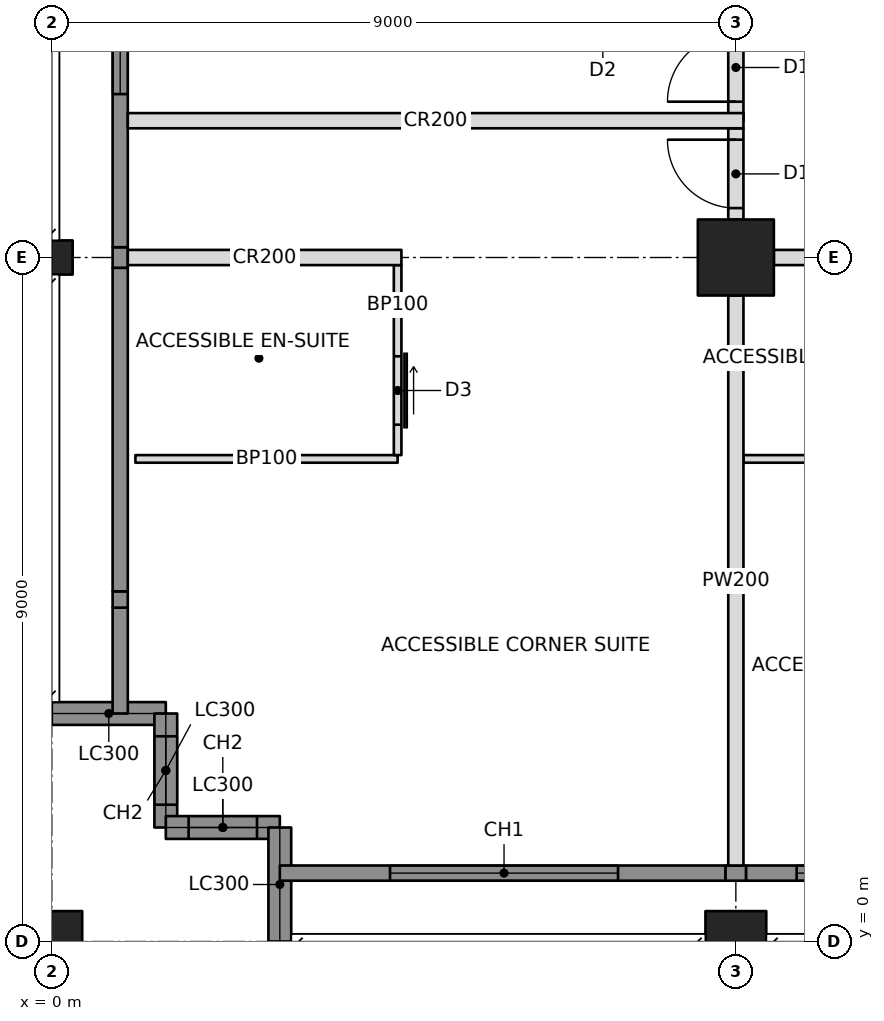
"""IFC4 building model, lengths in metres.
Left out: names, types, materials, properties, quantities, classifications, styles, units other than length and angle.
Written with IfcOpenShell. Run it as: python <this file> out.ifc"""

import sys

from ifc_helpers import new_model, si_unit, direction, frame, frame_2d, origin, origin_with_axes, origin_2d, place, context, subcontext, project, spatial, rectangle, hollow_rectangle, i_section, extrude, element, fill, save


model = new_model("IFC4")
c1 = context("Model", 3, precision=1e-05, world=origin(), true_north=direction((0.0, 1.0)))
c2 = subcontext(c1, "Body", "Model", "MODEL_VIEW")
j1 = project(units=[si_unit("LENGTHUNIT", "METRE"), si_unit("PLANEANGLEUNIT", "RADIAN")], contexts=[c1])
p1 = place(None, origin())
s1 = spatial("IfcSite", under=j1, at=p1, CompositionType="ELEMENT")
p2 = place(p1, origin())
s2 = spatial("IfcBuilding", under=s1, at=p2, CompositionType="ELEMENT")
p3 = place(p2, frame((0.0, 0.0, 163.8)))
s3 = spatial("IfcBuildingStorey", under=s2, at=p3, CompositionType="ELEMENT", Elevation=163.8)
p4 = place(p3, origin_with_axes())
e1 = element("IfcColumn", 1, at=p4, inside=s3, PredefinedType="COLUMN", context=c2, shape_type="SweptSolid", body=[
    extrude(hollow_rectangle(XDim=0.8, YDim=0.8, WallThickness=0.07, at=origin_2d()), origin(), (0.0, 0.0, 1.0), 3.4),
])
p5 = place(p3, frame((0.0, 9.0, 0.0), z_axis=(0.0, 0.0, 1.0), x_axis=(0.0, 1.0, 0.0)))
e2 = element("IfcColumn", 2, at=p5, inside=s3, PredefinedType="COLUMN", context=c2, shape_type="SweptSolid", body=[
    extrude(i_section(OverallWidth=0.449, OverallDepth=0.549, WebThickness=0.072, FlangeThickness=0.115, at=origin_2d()), origin(), (0.0, 0.0, 1.0), 3.4),
])
p6 = place(p3, frame((9.0, 0.0, 0.0), z_axis=(0.0, 0.0, 1.0), x_axis=(1.0, 0.0, 0.0)))
e3 = element("IfcColumn", 3, at=p6, inside=s3, PredefinedType="COLUMN", context=c2, shape_type="SweptSolid", body=[
    extrude(hollow_rectangle(XDim=0.8, YDim=0.8, WallThickness=0.07, at=origin_2d()), origin(), (0.0, 0.0, 1.0), 3.4),
])
p7 = place(p3, frame((9.0, 9.0, 0.0), z_axis=(0.0, 0.0, 1.0), x_axis=(1.0, 0.0, 0.0)))
e4 = element("IfcColumn", 4, at=p7, inside=s3, PredefinedType="COLUMN", context=c2, shape_type="SweptSolid", body=[
    extrude(hollow_rectangle(XDim=1.0, YDim=1.0, WallThickness=0.1, at=origin_2d()), origin(), (0.0, 0.0, 1.0), 3.4),
])
p8 = place(p3, frame((0.0, 3.0, 0.0), z_axis=(0.0, 0.0, 1.0), x_axis=(1.0, 0.0, 0.0)))
e5 = element("IfcWall", 5, at=p8, inside=s3, PredefinedType="SOLIDWALL", context=c2, shape_type="SweptSolid", body=[
    extrude(rectangle(XDim=1.5, YDim=0.3, at=frame_2d((0.75, 0.0))), origin(), (0.0, 0.0, 1.0), 2.42),
])
p9 = place(p3, frame((1.5, 3.0, 0.0), z_axis=(0.0, 0.0, 1.0), x_axis=(0.0, -1.0, 0.0)))
e6 = element("IfcWall", 6, at=p9, inside=s3, PredefinedType="SOLIDWALL", context=c2, shape_type="SweptSolid", body=[
    extrude(rectangle(XDim=1.5, YDim=0.3, at=frame_2d((0.75, 0.0))), origin(), (0.0, 0.0, 1.0), 3.2),
])
p10 = place(p9, frame((0.3, 0.0, 0.6)))
e7 = element("IfcOpeningElement", 7, at=p10, cuts=e6, PredefinedType="OPENING", context=c2, shape_type="SweptSolid", body=[
    extrude(rectangle(XDim=0.9, YDim=2.2, at=frame_2d((0.45, 1.1))), frame((0.0, 0.16, 0.0), z_axis=(0.0, -1.0, 0.0), x_axis=(1.0, 0.0, 0.0)), (0.0, 0.0, 1.0), 0.32),
])
p11 = place(p3, frame((1.5, 1.5, 0.0), z_axis=(0.0, 0.0, 1.0), x_axis=(1.0, 0.0, 0.0)))
e8 = element("IfcWall", 8, at=p11, inside=s3, PredefinedType="SOLIDWALL", context=c2, shape_type="SweptSolid", body=[
    extrude(rectangle(XDim=1.5, YDim=0.3, at=frame_2d((0.75, 0.0))), origin(), (0.0, 0.0, 1.0), 3.2),
])
p12 = place(p11, frame((0.3, 0.0, 0.6)))
e9 = element("IfcOpeningElement", 9, at=p12, cuts=e8, PredefinedType="OPENING", context=c2, shape_type="SweptSolid", body=[
    extrude(rectangle(XDim=0.9, YDim=2.2, at=frame_2d((0.45, 1.1))), frame((0.0, 0.16, 0.0), z_axis=(0.0, -1.0, 0.0), x_axis=(1.0, 0.0, 0.0)), (0.0, 0.0, 1.0), 0.32),
])
p13 = place(p3, frame((3.0, 1.5, 0.0), z_axis=(0.0, 0.0, 1.0), x_axis=(0.0, -1.0, 0.0)))
e10 = element("IfcWall", 10, at=p13, inside=s3, PredefinedType="SOLIDWALL", context=c2, shape_type="SweptSolid", body=[
    extrude(rectangle(XDim=1.5, YDim=0.3, at=frame_2d((0.75, 0.0))), origin(), (0.0, 0.0, 1.0), 2.42),
])
p14 = place(p3, frame((3.0, 0.9, 0.0), z_axis=(0.0, 0.0, 1.0), x_axis=(1.0, 0.0, 0.0)))
e11 = element("IfcWall", 11, at=p14, inside=s3, PredefinedType="SOLIDWALL", context=c2, shape_type="SweptSolid", body=[
    extrude(rectangle(XDim=5.865, YDim=0.2, at=frame_2d((2.932, 0.0))), origin(), (0.0, 0.0, 1.0), 3.2),
])
p15 = place(p14, frame((1.45, 0.0, 0.6)))
e12 = element("IfcOpeningElement", 12, at=p15, cuts=e11, PredefinedType="OPENING", context=c2, shape_type="SweptSolid", body=[
    extrude(rectangle(XDim=3.0, YDim=2.2, at=frame_2d((1.5, 1.1))), frame((0.0, 0.11, 0.0), z_axis=(0.0, -1.0, 0.0), x_axis=(1.0, 0.0, 0.0)), (0.0, 0.0, 1.0), 0.22),
])
p16 = place(p3, frame((0.9, 3.0, 0.0), z_axis=(0.0, 0.0, 1.0), x_axis=(0.0, 1.0, 0.0)))
e13 = element("IfcWall", 13, at=p16, inside=s3, PredefinedType="SOLIDWALL", context=c2, shape_type="SweptSolid", body=[
    extrude(rectangle(XDim=1.393, YDim=0.2, at=frame_2d((0.696, 0.0))), origin(), (0.0, 0.0, 1.0), 3.2),
])
p17 = place(p3, frame((1.0, 9.0, 0.0), z_axis=(0.0, 0.0, 1.0), x_axis=(1.0, 0.0, 0.0)))
e14 = element("IfcWall", 14, at=p17, inside=s3, PredefinedType="PARTITIONING", context=c2, shape_type="SweptSolid", body=[
    extrude(rectangle(XDim=3.6, YDim=0.2, at=frame_2d((1.8, 0.0))), origin(), (0.0, 0.0, 1.0), 2.438),
])
p18 = place(p3, frame((9.5, 9.0, 0.0), z_axis=(0.0, 0.0, 1.0), x_axis=(1.0, 0.0, 0.0)))
e15 = element("IfcWall", 15, at=p18, inside=s3, PredefinedType="PARTITIONING", context=c2, shape_type="SweptSolid", body=[
    extrude(rectangle(XDim=8.0, YDim=0.2, at=frame_2d((4.0, 0.0))), origin(), (0.0, 0.0, 1.0), 2.405),
])
p19 = place(p18, frame((2.85, 0.0, 0.0)))
e16 = element("IfcOpeningElement", 16, at=p19, cuts=e15, PredefinedType="OPENING", context=c2, shape_type="SweptSolid", body=[
    extrude(rectangle(XDim=0.9, YDim=2.1, at=frame_2d((0.45, 1.05))), frame((0.0, 0.11, 0.0), z_axis=(0.0, -1.0, 0.0), x_axis=(1.0, 0.0, 0.0)), (0.0, 0.0, 1.0), 0.22),
])
p20 = place(p18, frame((4.25, 0.0, 0.0)))
e17 = element("IfcOpeningElement", 17, at=p20, cuts=e15, PredefinedType="OPENING", context=c2, shape_type="SweptSolid", body=[
    extrude(rectangle(XDim=0.9, YDim=2.1, at=frame_2d((0.45, 1.05))), frame((0.0, 0.11, 0.0), z_axis=(0.0, -1.0, 0.0), x_axis=(1.0, 0.0, 0.0)), (0.0, 0.0, 1.0), 0.22),
])
p21 = place(p3, frame((9.0, 10.8, 0.0), z_axis=(0.0, 0.0, 1.0), x_axis=(0.0, 1.0, 0.0)))
e18 = element("IfcWall", 18, at=p21, inside=s3, PredefinedType="PARTITIONING", context=c2, shape_type="SweptSolid", body=[
    extrude(rectangle(XDim=6.7, YDim=0.2, at=frame_2d((3.35, 0.0))), origin(), (0.0, 0.0, 1.0), 2.405),
])
p22 = place(p21, frame((0.25, 0.0, 0.0)))
e19 = element("IfcOpeningElement", 19, at=p22, cuts=e18, PredefinedType="OPENING", context=c2, shape_type="SweptSolid", body=[
    extrude(rectangle(XDim=0.9, YDim=2.1, at=frame_2d((0.45, 1.05))), frame((0.0, 0.11, 0.0), z_axis=(0.0, -1.0, 0.0), x_axis=(1.0, 0.0, 0.0)), (0.0, 0.0, 1.0), 0.22),
])
p23 = place(p21, frame((3.85, 0.0, 0.0)))
e20 = element("IfcOpeningElement", 20, at=p23, cuts=e18, PredefinedType="OPENING", context=c2, shape_type="SweptSolid", body=[
    extrude(rectangle(XDim=0.9, YDim=2.1, at=frame_2d((0.45, 1.05))), frame((0.0, 0.11, 0.0), z_axis=(0.0, -1.0, 0.0), x_axis=(1.0, 0.0, 0.0)), (0.0, 0.0, 1.0), 0.22),
])
p24 = place(p3, frame((1.0, 10.8, 0.0), z_axis=(0.0, 0.0, 1.0), x_axis=(1.0, 0.0, 0.0)))
e21 = element("IfcWall", 21, at=p24, inside=s3, PredefinedType="PARTITIONING", context=c2, shape_type="SweptSolid", body=[
    extrude(rectangle(XDim=8.1, YDim=0.2, at=frame_2d((4.05, 0.0))), origin(), (0.0, 0.0, 1.0), 2.404),
])
p25 = place(p3, frame((9.0, 8.5, 0.0), z_axis=(0.0, 0.0, 1.0), x_axis=(0.0, -1.0, 0.0)))
e22 = element("IfcWall", 22, at=p25, inside=s3, PredefinedType="PARTITIONING", context=c2, shape_type="SweptSolid", body=[
    extrude(rectangle(XDim=7.5, YDim=0.2, at=frame_2d((3.75, 0.0))), origin(), (0.0, 0.0, 1.0), 2.438),
])
p26 = place(p3, frame((1.1, 6.35, 0.0), z_axis=(0.0, 0.0, 1.0), x_axis=(1.0, 0.0, 0.0)))
e23 = element("IfcWall", 23, at=p26, inside=s3, PredefinedType="PARTITIONING", context=c2, shape_type="SweptSolid", body=[
    extrude(rectangle(XDim=3.45, YDim=0.1, at=frame_2d((1.725, 0.0))), origin(), (0.0, 0.0, 1.0), 3.2),
])
p27 = place(p3, frame((4.55, 8.9, 0.0), z_axis=(0.0, 0.0, 1.0), x_axis=(0.0, -1.0, 0.0)))
e24 = element("IfcWall", 24, at=p27, inside=s3, PredefinedType="PARTITIONING", context=c2, shape_type="SweptSolid", body=[
    extrude(rectangle(XDim=2.5, YDim=0.1, at=frame_2d((1.25, 0.0))), origin(), (0.0, 0.0, 1.0), 2.438),
])
p28 = place(p27, frame((1.2, 0.0, 0.0)))
e25 = element("IfcOpeningElement", 25, at=p28, cuts=e24, PredefinedType="OPENING", context=c2, shape_type="SweptSolid", body=[
    extrude(rectangle(XDim=0.9, YDim=2.1, at=frame_2d((0.45, 1.05))), frame((0.0, 0.06, 0.0), z_axis=(0.0, -1.0, 0.0), x_axis=(1.0, 0.0, 0.0)), (0.0, 0.0, 1.0), 0.12),
])
p29 = place(p3, frame((9.1, 6.35, 0.0), z_axis=(0.0, 0.0, 1.0), x_axis=(1.0, 0.0, 0.0)))
e26 = element("IfcWall", 26, at=p29, inside=s3, PredefinedType="PARTITIONING", context=c2, shape_type="SweptSolid", body=[
    extrude(rectangle(XDim=2.95, YDim=0.1, at=frame_2d((1.475, 0.0))), origin(), (0.0, 0.0, 1.0), 2.438),
])
p30 = place(p3, frame((9.0, 9.5, 0.0), z_axis=(0.0, 0.0, 1.0), x_axis=(0.0, 1.0, 0.0)))
e27 = element("IfcWall", 27, at=p30, inside=s3, PredefinedType="PARTITIONING", context=c2, shape_type="SweptSolid", body=[
    extrude(rectangle(XDim=1.2, YDim=0.2, at=frame_2d((0.6, 0.0))), origin(), (0.0, 0.0, 1.0), 2.405),
])
p31 = place(p30, frame((0.15, 0.0, 0.0)))
e28 = element("IfcOpeningElement", 28, at=p31, cuts=e27, PredefinedType="OPENING", context=c2, shape_type="SweptSolid", body=[
    extrude(rectangle(XDim=0.9, YDim=2.1, at=frame_2d((0.45, 1.05))), frame((0.0, 0.11, 0.0), z_axis=(0.0, -1.0, 0.0), x_axis=(1.0, 0.0, 0.0)), (0.0, 0.0, 1.0), 0.22),
])
p32 = place(p3, frame((8.865, 0.9, 0.0), z_axis=(0.0, 0.0, 1.0), x_axis=(1.0, 0.0, 0.0)))
e29 = element("IfcWall", 29, at=p32, inside=s3, PredefinedType="SOLIDWALL", context=c2, shape_type="SweptSolid", body=[
    extrude(rectangle(XDim=0.271, YDim=0.2, at=frame_2d((0.135, 0.0))), origin(), (0.0, 0.0, 1.0), 2.438),
])
p33 = place(p3, frame((9.135, 0.9, 0.0), z_axis=(0.0, 0.0, 1.0), x_axis=(1.0, 0.0, 0.0)))
e30 = element("IfcWall", 30, at=p33, inside=s3, PredefinedType="SOLIDWALL", context=c2, shape_type="SweptSolid", body=[
    extrude(rectangle(XDim=8.671, YDim=0.2, at=frame_2d((4.335, 0.0))), origin(), (0.0, 0.0, 1.0), 3.2),
])
p34 = place(p33, frame((0.665, 0.0, 0.6)))
e31 = element("IfcOpeningElement", 31, at=p34, cuts=e30, PredefinedType="OPENING", context=c2, shape_type="SweptSolid", body=[
    extrude(rectangle(XDim=3.0, YDim=2.2, at=frame_2d((1.5, 1.1))), frame((0.0, 0.11, 0.0), z_axis=(0.0, -1.0, 0.0), x_axis=(1.0, 0.0, 0.0)), (0.0, 0.0, 1.0), 0.22),
])
p35 = place(p33, frame((5.065, 0.0, 0.6)))
e32 = element("IfcOpeningElement", 32, at=p35, cuts=e30, PredefinedType="OPENING", context=c2, shape_type="SweptSolid", body=[
    extrude(rectangle(XDim=3.0, YDim=2.2, at=frame_2d((1.5, 1.1))), frame((0.0, 0.11, 0.0), z_axis=(0.0, -1.0, 0.0), x_axis=(1.0, 0.0, 0.0)), (0.0, 0.0, 1.0), 0.22),
])
p36 = place(p3, frame((0.9, 4.393, 0.0), z_axis=(0.0, 0.0, 1.0), x_axis=(0.0, 1.0, 0.0)))
e33 = element("IfcWall", 33, at=p36, inside=s3, PredefinedType="SOLIDWALL", context=c2, shape_type="SweptSolid", body=[
    extrude(rectangle(XDim=0.215, YDim=0.2, at=frame_2d((0.107, 0.0))), origin(), (0.0, 0.0, 1.0), 2.661),
])
p37 = place(p3, frame((0.9, 4.607, 0.0), z_axis=(0.0, 0.0, 1.0), x_axis=(0.0, 1.0, 0.0)))
e34 = element("IfcWall", 34, at=p37, inside=s3, PredefinedType="SOLIDWALL", context=c2, shape_type="SweptSolid", body=[
    extrude(rectangle(XDim=4.257, YDim=0.2, at=frame_2d((2.129, 0.0))), origin(), (0.0, 0.0, 1.0), 3.2),
])
p38 = place(p3, frame((0.9, 8.865, 0.0), z_axis=(0.0, 0.0, 1.0), x_axis=(0.0, 1.0, 0.0)))
e35 = element("IfcWall", 35, at=p38, inside=s3, PredefinedType="SOLIDWALL", context=c2, shape_type="SweptSolid", body=[
    extrude(rectangle(XDim=0.271, YDim=0.2, at=frame_2d((0.135, 0.0))), origin(), (0.0, 0.0, 1.0), 2.438),
])
p39 = place(p3, frame((0.9, 9.135, 0.0), z_axis=(0.0, 0.0, 1.0), x_axis=(0.0, 1.0, 0.0)))
e36 = element("IfcWall", 36, at=p39, inside=s3, PredefinedType="SOLIDWALL", context=c2, shape_type="SweptSolid", body=[
    extrude(rectangle(XDim=8.671, YDim=0.2, at=frame_2d((4.335, 0.0))), origin(), (0.0, 0.0, 1.0), 3.2),
])
p40 = place(p39, frame((2.015, 0.0, 0.6)))
e37 = element("IfcOpeningElement", 37, at=p40, cuts=e36, PredefinedType="OPENING", context=c2, shape_type="SweptSolid", body=[
    extrude(rectangle(XDim=3.0, YDim=2.2, at=frame_2d((1.5, 1.1))), frame((0.0, 0.11, 0.0), z_axis=(0.0, -1.0, 0.0), x_axis=(1.0, 0.0, 0.0)), (0.0, 0.0, 1.0), 0.22),
])
p41 = place(p39, frame((5.515, 0.0, 0.6)))
e38 = element("IfcOpeningElement", 38, at=p41, cuts=e36, PredefinedType="OPENING", context=c2, shape_type="SweptSolid", body=[
    extrude(rectangle(XDim=3.0, YDim=2.2, at=frame_2d((1.5, 1.1))), frame((0.0, 0.11, 0.0), z_axis=(0.0, -1.0, 0.0), x_axis=(1.0, 0.0, 0.0)), (0.0, 0.0, 1.0), 0.22),
])
p42 = place(p10, origin())
e39 = element("IfcWindow", 39, at=p42, inside=s3, PartitioningType="SINGLE_PANEL", PredefinedType="WINDOW", context=c2, shape_type="SweptSolid", body=[
    extrude(rectangle(XDim=0.9, YDim=2.2, at=frame_2d((0.45, 1.1))), frame((0.0, 0.03, 0.0), z_axis=(0.0, -1.0, 0.0), x_axis=(1.0, 0.0, 0.0)), (0.0, 0.0, 1.0), 0.06),
])
fill(e7, e39)
p43 = place(p12, origin())
e40 = element("IfcWindow", 40, at=p43, inside=s3, PartitioningType="SINGLE_PANEL", PredefinedType="WINDOW", context=c2, shape_type="SweptSolid", body=[
    extrude(rectangle(XDim=0.9, YDim=2.2, at=frame_2d((0.45, 1.1))), frame((0.0, 0.03, 0.0), z_axis=(0.0, -1.0, 0.0), x_axis=(1.0, 0.0, 0.0)), (0.0, 0.0, 1.0), 0.06),
])
fill(e9, e40)
p44 = place(p15, origin())
e41 = element("IfcWindow", 41, at=p44, inside=s3, PartitioningType="TRIPLE_PANEL_VERTICAL", PredefinedType="WINDOW", context=c2, shape_type="SweptSolid", body=[
    extrude(rectangle(XDim=3.0, YDim=2.2, at=frame_2d((1.5, 1.1))), frame((0.0, 0.03, 0.0), z_axis=(0.0, -1.0, 0.0), x_axis=(1.0, 0.0, 0.0)), (0.0, 0.0, 1.0), 0.06),
])
fill(e12, e41)
p45 = place(p34, origin())
e42 = element("IfcWindow", 42, at=p45, inside=s3, PartitioningType="TRIPLE_PANEL_VERTICAL", PredefinedType="WINDOW", context=c2, shape_type="SweptSolid", body=[
    extrude(rectangle(XDim=3.0, YDim=2.2, at=frame_2d((1.5, 1.1))), frame((0.0, 0.03, 0.0), z_axis=(0.0, -1.0, 0.0), x_axis=(1.0, 0.0, 0.0)), (0.0, 0.0, 1.0), 0.06),
])
fill(e31, e42)
p46 = place(p40, origin())
e43 = element("IfcWindow", 43, at=p46, inside=s3, PartitioningType="TRIPLE_PANEL_VERTICAL", PredefinedType="WINDOW", context=c2, shape_type="SweptSolid", body=[
    extrude(rectangle(XDim=3.0, YDim=2.2, at=frame_2d((1.5, 1.1))), frame((0.0, 0.03, 0.0), z_axis=(0.0, -1.0, 0.0), x_axis=(1.0, 0.0, 0.0)), (0.0, 0.0, 1.0), 0.06),
])
fill(e37, e43)
p47 = place(p28, origin())
e44 = element("IfcDoor", 44, at=p47, inside=s3, OperationType="SLIDING_TO_LEFT", PredefinedType="DOOR", context=c2, shape_type="SweptSolid", body=[
    extrude(rectangle(XDim=0.9, YDim=2.1, at=frame_2d((0.45, 1.05))), frame((0.0, 0.025, 0.0), z_axis=(0.0, -1.0, 0.0), x_axis=(1.0, 0.0, 0.0)), (0.0, 0.0, 1.0), 0.05),
])
fill(e25, e44)
p48 = place(p22, origin())
e45 = element("IfcDoor", 45, at=p48, inside=s3, OperationType="SINGLE_SWING_LEFT", PredefinedType="DOOR", context=c2, shape_type="SweptSolid", body=[
    extrude(rectangle(XDim=0.9, YDim=2.1, at=frame_2d((0.45, 1.05))), frame((0.0, 0.025, 0.0), z_axis=(0.0, -1.0, 0.0), x_axis=(1.0, 0.0, 0.0)), (0.0, 0.0, 1.0), 0.05),
])
fill(e19, e45)
p49 = place(p31, origin())
e46 = element("IfcDoor", 46, at=p49, inside=s3, OperationType="SINGLE_SWING_RIGHT", PredefinedType="DOOR", context=c2, shape_type="SweptSolid", body=[
    extrude(rectangle(XDim=0.9, YDim=2.1, at=frame_2d((0.45, 1.05))), frame((0.0, 0.025, 0.0), z_axis=(0.0, -1.0, 0.0), x_axis=(1.0, 0.0, 0.0)), (0.0, 0.0, 1.0), 0.05),
])
fill(e28, e46)
save(model, sys.argv[1])
